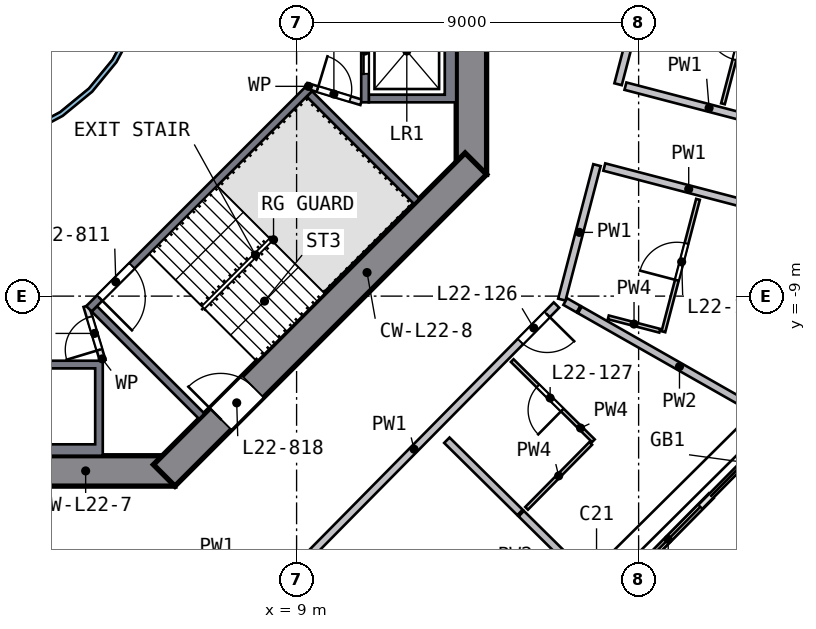
"""IFC4 building model, lengths in metres.
Left out: names, types, materials, properties, quantities, classifications, styles, units other than length and angle.
Written with IfcOpenShell. Run it as: python <this file> out.ifc"""

import sys

from ifc_helpers import new_model, si_unit, direction, frame, frame_2d, origin, origin_2d, place, context, subcontext, project, spatial, polyline, rectangle, outline, extrude, element, fill, save


model = new_model("IFC4")
c1 = context("Model", 3, precision=1e-05, world=origin(), true_north=direction((0.0, 1.0)))
c2 = subcontext(c1, "Body", "Model", "MODEL_VIEW")
j1 = project(units=[si_unit("LENGTHUNIT", "METRE"), si_unit("PLANEANGLEUNIT", "RADIAN")], contexts=[c1])
p1 = place(None, origin())
s1 = spatial("IfcSite", under=j1, at=p1, CompositionType="ELEMENT")
p2 = place(p1, origin())
s2 = spatial("IfcBuilding", under=s1, at=p2, CompositionType="ELEMENT")
p3 = place(p2, frame((0.0, 0.0, 96.5)))
s3 = spatial("IfcBuildingStorey", under=s2, at=p3, CompositionType="ELEMENT", Elevation=96.5)
p4 = place(p3, frame((16.798, -16.588, 0.0), z_axis=(0.078255888, 0.080537401, 0.993674868), x_axis=(0.698489901, 0.706754906, -0.112291409)))
e1 = element("IfcColumn", 1, at=p4, inside=s3, PredefinedType="COLUMN", context=c2, shape_type="SweptSolid", body=[
    extrude(rectangle(XDim=1.15, YDim=0.9, at=origin_2d()), origin(), (0.0, 0.0, 1.0), 3.21),
])
p5 = place(p3, frame((13.6, -5.799, 0.0), z_axis=(0.0, 0.0, 1.0), x_axis=(0.0, 1.0, 0.0)))
e2 = element("IfcWall", 2, at=p5, inside=s3, PredefinedType="SHEAR", context=c2, shape_type="SweptSolid", body=[
    extrude(rectangle(XDim=11.598, YDim=0.8, at=frame_2d((5.799, 0.0))), origin(), (0.0, 0.0, 1.0), 3.5),
])
p6 = place(p5, frame((4.899, 0.0, 0.0)))
e3 = element("IfcOpeningElement", 3, at=p6, cuts=e2, PredefinedType="OPENING", context=c2, shape_type="SweptSolid", body=[
    extrude(rectangle(XDim=1.8, YDim=2.1, at=frame_2d((0.9, 1.05))), frame((0.0, 0.41, 0.0), z_axis=(0.0, -1.0, 0.0), x_axis=(1.0, 0.0, 0.0)), (0.0, 0.0, 1.0), 0.82),
])
p7 = place(p3, frame((-5.799, -13.6, 0.0), z_axis=(0.0, 0.0, 1.0), x_axis=(1.0, 0.0, 0.0)))
e4 = element("IfcWall", 4, at=p7, inside=s3, PredefinedType="SHEAR", context=c2, shape_type="SweptSolid", body=[
    extrude(rectangle(XDim=11.598, YDim=0.8, at=frame_2d((5.799, 0.0))), origin(), (0.0, 0.0, 1.0), 3.5),
])
p8 = place(p7, frame((4.899, 0.0, 0.0)))
e5 = element("IfcOpeningElement", 5, at=p8, cuts=e4, PredefinedType="OPENING", context=c2, shape_type="SweptSolid", body=[
    extrude(rectangle(XDim=1.8, YDim=2.1, at=frame_2d((0.9, 1.05))), frame((0.0, 0.41, 0.0), z_axis=(0.0, -1.0, 0.0), x_axis=(1.0, 0.0, 0.0)), (0.0, 0.0, 1.0), 0.82),
])
p9 = place(p3, frame((5.516, -13.717, 0.0), z_axis=(0.0, 0.0, 1.0), x_axis=(0.707106781, 0.707106781, 0.0)))
e6 = element("IfcWall", 6, at=p9, inside=s3, PredefinedType="SHEAR", context=c2, shape_type="SweptSolid", body=[
    extrude(rectangle(XDim=11.598, YDim=0.8, at=frame_2d((5.799, 0.0))), origin(), (0.0, 0.0, 1.0), 3.5),
])
p10 = place(p9, frame((2.099, 0.0, 0.0)))
e7 = element("IfcOpeningElement", 7, at=p10, cuts=e6, PredefinedType="OPENING", context=c2, shape_type="SweptSolid", body=[
    extrude(rectangle(XDim=1.2, YDim=2.1, at=frame_2d((0.6, 1.05))), frame((0.0, 0.41, 0.0), z_axis=(0.0, -1.0, 0.0), x_axis=(1.0, 0.0, 0.0)), (0.0, 0.0, 1.0), 0.82),
])
p11 = place(p3, frame((17.207, -16.992, 0.0), z_axis=(0.0, 0.0, 1.0), x_axis=(0.702669036, 0.711516848, 0.0)))
e8 = element("IfcWall", 8, at=p11, inside=s3, PredefinedType="SOLIDWALL", context=c2, shape_type="SweptSolid", body=[
    extrude(rectangle(XDim=3.835, YDim=0.15, at=frame_2d((1.918, 0.0))), origin(), (0.0, 0.0, 1.0), 2.425),
])
p12 = place(p11, frame((1.035, 0.0, 0.0)))
e9 = element("IfcOpeningElement", 9, at=p12, cuts=e8, PredefinedType="OPENING", context=c2, shape_type="SweptSolid", body=[
    extrude(rectangle(XDim=2.4, YDim=2.4, at=frame_2d((1.2, 1.2))), frame((0.0, 0.085, 0.0), z_axis=(0.0, -1.0, 0.0), x_axis=(1.0, 0.0, 0.0)), (0.0, 0.0, 1.0), 0.17),
])
p13 = place(p3, frame((14.284, -24.258, 0.0), z_axis=(0.0, 0.0, 1.0), x_axis=(0.702654229, 0.711531471, 0.0)))
e10 = element("IfcWall", 10, at=p13, inside=s3, PredefinedType="SOLIDWALL", context=c2, shape_type="SweptSolid", body=[
    extrude(rectangle(XDim=13.723, YDim=0.5, at=frame_2d((6.862, 0.0))), origin(), (0.0, 0.0, 1.0), 0.7),
])
p14 = place(p3, origin())
e11 = element("IfcWall", 11, at=p14, inside=s3, PredefinedType="SOLIDWALL", context=c2, shape_type="SweptSolid", body=[
    extrude(outline(polyline([(13.2, -3.9), (10.9, -3.9), (10.9, -3.7), (12.9, -3.7), (12.9, -1.4), (10.9, -1.4), (10.9, -1.2), (13.2, -1.2), (13.2, -3.9)])), origin(), (0.0, 0.0, 1.0), 3.19),
])
p15 = place(p3, frame((10.8, -1.2, 0.0), z_axis=(0.0, 0.0, 1.0), x_axis=(0.0, -1.0, 0.0)))
e12 = element("IfcWall", 12, at=p15, inside=s3, PredefinedType="SOLIDWALL", context=c2, shape_type="SweptSolid", body=[
    extrude(rectangle(XDim=2.7, YDim=0.2, at=frame_2d((1.35, 0.0))), origin(), (0.0, 0.0, 1.0), 3.19),
])
p16 = place(p15, frame((0.75, 0.0, 0.0)))
e13 = element("IfcOpeningElement", 13, at=p16, cuts=e12, PredefinedType="OPENING", context=c2, shape_type="SweptSolid", body=[
    extrude(rectangle(XDim=1.2, YDim=2.1, at=frame_2d((0.6, 1.05))), frame((0.0, 0.11, 0.0), z_axis=(0.0, -1.0, 0.0), x_axis=(1.0, 0.0, 0.0)), (0.0, 0.0, 1.0), 0.22),
])
p17 = place(p3, origin())
e14 = element("IfcWall", 14, at=p17, inside=s3, PredefinedType="SOLIDWALL", context=c2, shape_type="SweptSolid", body=[
    extrude(outline(polyline([(3.9, -10.7), (3.9, -13.2), (1.2, -13.2), (1.2, -10.7), (3.9, -10.7)]), holes=[polyline([(1.4, -12.9), (3.7, -12.9), (3.7, -10.9), (1.4, -10.9), (1.4, -12.9)])]), origin(), (0.0, 0.0, 1.0), 3.19),
])
p18 = place(p3, frame((9.334, -3.535, 0.0), z_axis=(0.0, 0.0, 1.0), x_axis=(-0.707106781, -0.707106781, 0.0)))
e15 = element("IfcWall", 15, at=p18, inside=s3, PredefinedType="SOLIDWALL", context=c2, shape_type="SweptSolid", body=[
    extrude(rectangle(XDim=8.2, YDim=0.2, at=frame_2d((4.1, 0.0))), origin(), (0.0, 0.0, 1.0), 3.19),
])
p19 = place(p18, frame((6.6, 0.0, 0.0)))
e16 = element("IfcOpeningElement", 16, at=p19, cuts=e15, PredefinedType="OPENING", context=c2, shape_type="SweptSolid", body=[
    extrude(rectangle(XDim=1.2, YDim=2.1, at=frame_2d((0.6, 1.05))), frame((0.0, 0.11, 0.0), z_axis=(0.0, -1.0, 0.0), x_axis=(1.0, 0.0, 0.0)), (0.0, 0.0, 1.0), 0.22),
])
for number, where, z_axis, x_axis in (
    (17, (3.677, -9.334, 0.0), (0.0, 0.0, 1.0), (0.707, -0.707, 0.0)),
    (18, (9.334, -3.677, 0.0), (0.0, 0.0, 1.0), (0.707, -0.707, 0.0)),
):
    element("IfcWall", number, at=place(p3, frame(where, z_axis=z_axis, x_axis=x_axis)), inside=s3, PredefinedType="SOLIDWALL", context=c2, shape_type="SweptSolid", body=[
        extrude(rectangle(XDim=4.0, YDim=0.2, at=frame_2d((2.0, 0.0))), origin(), (0.0, 0.0, 1.0), 3.19),
    ])
p20 = place(p3, frame((3.9, -10.7, 0.0), z_axis=(0.0, 0.0, 1.0), x_axis=(-0.289808785, 0.957084567, 0.0)))
e19 = element("IfcWall", 19, at=p20, inside=s3, PredefinedType="PARTITIONING", context=c2, shape_type="SweptSolid", body=[
    extrude(rectangle(XDim=1.501, YDim=0.15, at=frame_2d((0.75, 0.0))), origin(), (0.0, 0.0, 1.0), 3.19),
])
p21 = place(p20, frame((0.301, 0.0, 0.0)))
e20 = element("IfcOpeningElement", 20, at=p21, cuts=e19, PredefinedType="OPENING", context=c2, shape_type="SweptSolid", body=[
    extrude(rectangle(XDim=0.9, YDim=2.1, at=frame_2d((0.45, 1.05))), frame((0.0, 0.085, 0.0), z_axis=(0.0, -1.0, 0.0), x_axis=(1.0, 0.0, 0.0)), (0.0, 0.0, 1.0), 0.17),
])
p22 = place(p3, frame((9.263, -3.465, 0.0), z_axis=(0.0, 0.0, 1.0), x_axis=(0.957084567, -0.289808785, 0.0)))
e21 = element("IfcWall", 21, at=p22, inside=s3, PredefinedType="PARTITIONING", context=c2, shape_type="SweptSolid", body=[
    extrude(rectangle(XDim=1.501, YDim=0.15, at=frame_2d((0.75, 0.0))), origin(), (0.0, 0.0, 1.0), 3.19),
])
p23 = place(p22, frame((0.301, 0.0, 0.0)))
e22 = element("IfcOpeningElement", 22, at=p23, cuts=e21, PredefinedType="OPENING", context=c2, shape_type="SweptSolid", body=[
    extrude(rectangle(XDim=0.9, YDim=2.1, at=frame_2d((0.45, 1.05))), frame((0.0, 0.085, 0.0), z_axis=(0.0, -1.0, 0.0), x_axis=(1.0, 0.0, 0.0)), (0.0, 0.0, 1.0), 0.17),
])
p24 = place(p3, origin())
e23 = element("IfcWall", 23, at=p24, inside=s3, PredefinedType="SOLIDWALL", context=c2, shape_type="SweptSolid", body=[
    extrude(outline(polyline([(5.021, -0.999), (4.73, -1.959), (4.257, -2.844), (3.62, -3.62), (2.844, -4.257), (1.959, -4.73), (0.999, -5.021), (0.0, -5.12), (-0.999, -5.021), (-1.959, -4.73), (-2.844, -4.257), (-3.62, -3.62), (-4.257, -2.844), (-4.73, -1.959), (-5.021, -0.999), (-5.12, 0.0), (-5.021, 0.999), (-4.73, 1.959), (-4.257, 2.844), (-3.62, 3.62), (-2.844, 4.257), (-1.959, 4.73), (-0.999, 5.021), (0.0, 5.12), (0.999, 5.021), (1.959, 4.73), (2.844, 4.257), (3.62, 3.62), (4.257, 2.844), (4.73, 1.959), (5.021, 0.999), (5.12, 0.0), (5.021, -0.999)]), holes=[polyline([(4.904, 0.976), (4.619, 1.913), (4.157, 2.778), (3.535, 3.535), (2.778, 4.157), (1.913, 4.619), (0.976, 4.904), (0.0, 5.0), (-0.976, 4.904), (-1.913, 4.619), (-2.778, 4.157), (-3.535, 3.535), (-4.157, 2.778), (-4.619, 1.913), (-4.904, 0.976), (-5.0, 0.0), (-4.904, -0.976), (-4.619, -1.913), (-4.157, -2.778), (-3.535, -3.535), (-2.778, -4.157), (-1.913, -4.619), (-0.976, -4.904), (0.0, -5.0), (0.976, -4.904), (1.913, -4.619), (2.778, -4.157), (3.535, -3.535), (4.157, -2.778), (4.619, -1.913), (4.904, -0.976), (5.0, 0.0), (4.904, 0.976)])]), origin(), (0.0, 0.0, 1.0), 3.19),
])
p25 = place(p3, frame((15.839, -9.235, 0.0), z_axis=(0.0, 0.0, 1.0), x_axis=(-0.702660587, -0.711525192, 0.0)))
e24 = element("IfcWall", 24, at=p25, inside=s3, PredefinedType="SOLIDWALL", context=c2, shape_type="SweptSolid", body=[
    extrude(rectangle(XDim=9.116, YDim=0.2, at=frame_2d((4.558, 0.0))), origin(), (0.0, 0.0, 1.0), 3.19),
])
p26 = place(p25, frame((0.35, 0.0, 0.0)))
e25 = element("IfcOpeningElement", 25, at=p26, cuts=e24, PredefinedType="OPENING", context=c2, shape_type="SweptSolid", body=[
    extrude(rectangle(XDim=1.0, YDim=2.1, at=frame_2d((0.5, 1.05))), frame((0.0, 0.11, 0.0), z_axis=(0.0, -1.0, 0.0), x_axis=(1.0, 0.0, 0.0)), (0.0, 0.0, 1.0), 0.22),
])
p27 = place(p3, frame((15.979, -9.092, 0.0), z_axis=(0.0, 0.0, 1.0), x_axis=(0.25277502, 0.967525084, 0.0)))
e26 = element("IfcWall", 26, at=p27, inside=s3, PredefinedType="SOLIDWALL", context=c2, shape_type="SweptSolid", body=[
    extrude(rectangle(XDim=3.659, YDim=0.2, at=frame_2d((1.829, 0.0))), origin(), (0.0, 0.0, 1.0), 3.19),
])
p28 = place(p3, frame((17.46, -3.424, 0.0), z_axis=(0.0, 0.0, 1.0), x_axis=(0.252791341, 0.96752082, 0.0)))
e27 = element("IfcWall", 27, at=p28, inside=s3, PredefinedType="SOLIDWALL", context=c2, shape_type="SweptSolid", body=[
    extrude(rectangle(XDim=3.658, YDim=0.2, at=frame_2d((1.829, 0.0))), origin(), (0.0, 0.0, 1.0), 3.19),
])
p29 = place(p3, frame((25.989, -7.926, 0.0), z_axis=(0.0, 0.0, 1.0), x_axis=(-0.967533715, 0.252741983, 0.0)))
e28 = element("IfcWall", 28, at=p29, inside=s3, PredefinedType="SOLIDWALL", context=c2, shape_type="SweptSolid", body=[
    extrude(rectangle(XDim=9.19, YDim=0.2, at=frame_2d((4.595, 0.0))), origin(), (0.0, 0.0, 1.0), 3.19),
])
p30 = place(p29, frame((3.4, 0.0, 0.0)))
e29 = element("IfcOpeningElement", 29, at=p30, cuts=e28, PredefinedType="OPENING", context=c2, shape_type="SweptSolid", body=[
    extrude(rectangle(XDim=1.0, YDim=2.1, at=frame_2d((0.5, 1.05))), frame((0.0, 0.11, 0.0), z_axis=(0.0, -1.0, 0.0), x_axis=(1.0, 0.0, 0.0)), (0.0, 0.0, 1.0), 0.22),
])
p31 = place(p3, frame((17.653, -3.475, 0.0), z_axis=(0.0, 0.0, 1.0), x_axis=(0.967535412, -0.252735487, 0.0)))
e30 = element("IfcWall", 30, at=p31, inside=s3, PredefinedType="SOLIDWALL", context=c2, shape_type="SweptSolid", body=[
    extrude(rectangle(XDim=9.19, YDim=0.2, at=frame_2d((4.595, 0.0))), origin(), (0.0, 0.0, 1.0), 3.19),
])
p32 = place(p31, frame((4.75, 0.0, 0.0)))
e31 = element("IfcOpeningElement", 31, at=p32, cuts=e30, PredefinedType="OPENING", context=c2, shape_type="SweptSolid", body=[
    extrude(rectangle(XDim=1.0, YDim=2.1, at=frame_2d((0.5, 1.05))), frame((0.0, 0.11, 0.0), z_axis=(0.0, -1.0, 0.0), x_axis=(1.0, 0.0, 0.0)), (0.0, 0.0, 1.0), 0.22),
])
p33 = place(p3, frame((12.954, -12.792, 0.0), z_axis=(0.0, 0.0, 1.0), x_axis=(0.711560793, -0.702624535, 0.0)))
e32 = element("IfcWall", 32, at=p33, inside=s3, PredefinedType="SOLIDWALL", context=c2, shape_type="SweptSolid", body=[
    extrude(rectangle(XDim=2.705, YDim=0.2, at=frame_2d((1.352, 0.0))), origin(), (0.0, 0.0, 1.0), 3.19),
])
p34 = place(p3, frame((14.911, -14.725, 0.0), z_axis=(0.0, 0.0, 1.0), x_axis=(0.711546698, -0.702638809, 0.0)))
e33 = element("IfcWall", 33, at=p34, inside=s3, PredefinedType="SOLIDWALL", context=c2, shape_type="SweptSolid", body=[
    extrude(rectangle(XDim=3.152, YDim=0.2, at=frame_2d((1.576, 0.0))), origin(), (0.0, 0.0, 1.0), 3.19),
])
p35 = place(p3, frame((16.069, -9.143, 0.0), z_axis=(0.0, 0.0, 1.0), x_axis=(0.869064731, -0.494698386, 0.0)))
e34 = element("IfcWall", 34, at=p35, inside=s3, PredefinedType="SOLIDWALL", context=c2, shape_type="SweptSolid", body=[
    extrude(rectangle(XDim=0.402, YDim=0.2, at=frame_2d((0.201, 0.0))), origin(), (0.0, 0.0, 1.0), 3.19),
])
p36 = place(p3, frame((16.453, -9.362, 0.0), z_axis=(0.0, 0.0, 1.0), x_axis=(0.869145541, -0.494556396, 0.0)))
e35 = element("IfcWall", 35, at=p36, inside=s3, PredefinedType="SOLIDWALL", context=c2, shape_type="SweptSolid", body=[
    extrude(rectangle(XDim=6.034, YDim=0.2, at=frame_2d((3.017, 0.0))), origin(), (0.0, 0.0, 1.0), 3.19),
])
p37 = place(p3, frame((16.81, -12.805, 0.0), z_axis=(0.0, 0.0, 1.0), x_axis=(-0.711568401, 0.702616831, 0.0)))
e36 = element("IfcWall", 36, at=p37, inside=s3, PredefinedType="PARTITIONING", context=c2, shape_type="SweptSolid", body=[
    extrude(rectangle(XDim=3.0, YDim=0.1, at=frame_2d((1.5, 0.0))), origin(), (0.0, 0.0, 1.0), 3.19),
])
p38 = place(p37, frame((1.15, 0.0, 0.0)))
e37 = element("IfcOpeningElement", 37, at=p38, cuts=e36, PredefinedType="OPENING", context=c2, shape_type="SweptSolid", body=[
    extrude(rectangle(XDim=0.9, YDim=2.1, at=frame_2d((0.45, 1.05))), frame((0.0, 0.06, 0.0), z_axis=(0.0, -1.0, 0.0), x_axis=(1.0, 0.0, 0.0)), (0.0, 0.0, 1.0), 0.12),
])
p39 = place(p3, frame((16.74, -12.876, 0.0), z_axis=(0.0, 0.0, 1.0), x_axis=(-0.702719059, -0.711467444, 0.0)))
e38 = element("IfcWall", 38, at=p39, inside=s3, PredefinedType="PARTITIONING", context=c2, shape_type="SweptSolid", body=[
    extrude(rectangle(XDim=2.4, YDim=0.1, at=frame_2d((1.2, 0.0))), origin(), (0.0, 0.0, 1.0), 3.19),
])
p40 = place(p3, frame((18.556, -9.912, 0.0), z_axis=(0.0, 0.0, 1.0), x_axis=(-0.96753195, 0.25274874, 0.0)))
e39 = element("IfcWall", 39, at=p40, inside=s3, PredefinedType="PARTITIONING", context=c2, shape_type="SweptSolid", body=[
    extrude(rectangle(XDim=1.399, YDim=0.1, at=frame_2d((0.699, 0.0))), origin(), (0.0, 0.0, 1.0), 3.19),
])
p41 = place(p3, frame((18.652, -9.937, 0.0), z_axis=(0.0, 0.0, 1.0), x_axis=(0.2527504, 0.967531516, 0.0)))
e40 = element("IfcWall", 40, at=p41, inside=s3, PredefinedType="PARTITIONING", context=c2, shape_type="SweptSolid", body=[
    extrude(rectangle(XDim=3.6, YDim=0.1, at=frame_2d((1.8, 0.0))), origin(), (0.0, 0.0, 1.0), 3.19),
])
p42 = place(p41, frame((1.4, 0.0, 0.0)))
e41 = element("IfcOpeningElement", 41, at=p42, cuts=e40, PredefinedType="OPENING", context=c2, shape_type="SweptSolid", body=[
    extrude(rectangle(XDim=1.0, YDim=2.1, at=frame_2d((0.5, 1.05))), frame((0.0, 0.06, 0.0), z_axis=(0.0, -1.0, 0.0), x_axis=(1.0, 0.0, 0.0)), (0.0, 0.0, 1.0), 0.12),
])
p43 = place(p3, frame((20.219, -3.938, 0.0), z_axis=(0.0, 0.0, 1.0), x_axis=(0.2527504, 0.967531516, 0.0)))
e42 = element("IfcWall", 42, at=p43, inside=s3, PredefinedType="PARTITIONING", context=c2, shape_type="SweptSolid", body=[
    extrude(rectangle(XDim=3.6, YDim=0.1, at=frame_2d((1.8, 0.0))), origin(), (0.0, 0.0, 1.0), 3.19),
])
p44 = place(p43, frame((1.2, 0.0, 0.0)))
e43 = element("IfcOpeningElement", 43, at=p44, cuts=e42, PredefinedType="OPENING", context=c2, shape_type="SweptSolid", body=[
    extrude(rectangle(XDim=1.0, YDim=2.1, at=frame_2d((0.5, 1.05))), frame((0.0, 0.06, 0.0), z_axis=(0.0, -1.0, 0.0), x_axis=(1.0, 0.0, 0.0)), (0.0, 0.0, 1.0), 0.12),
])
p45 = place(p12, origin())
e44 = element("IfcDoor", 44, at=p45, inside=s3, OperationType="SLIDING_TO_LEFT", PredefinedType="DOOR", context=c2, shape_type="SweptSolid", body=[
    extrude(rectangle(XDim=2.4, YDim=2.4, at=frame_2d((1.2, 1.2))), frame((0.0, 0.025, 0.0), z_axis=(0.0, -1.0, 0.0), x_axis=(1.0, 0.0, 0.0)), (0.0, 0.0, 1.0), 0.05),
])
fill(e9, e44)
p46 = place(p16, origin())
e45 = element("IfcDoor", 45, at=p46, inside=s3, OperationType="DOUBLE_DOOR_SLIDING", PredefinedType="DOOR", context=c2, shape_type="SweptSolid", body=[
    extrude(rectangle(XDim=1.2, YDim=2.1, at=frame_2d((0.6, 1.05))), frame((0.0, 0.025, 0.0), z_axis=(0.0, -1.0, 0.0), x_axis=(1.0, 0.0, 0.0)), (0.0, 0.0, 1.0), 0.05),
])
fill(e13, e45)
p47 = place(p19, origin())
e46 = element("IfcDoor", 46, at=p47, inside=s3, OperationType="SINGLE_SWING_RIGHT", PredefinedType="DOOR", context=c2, shape_type="SweptSolid", body=[
    extrude(rectangle(XDim=1.2, YDim=2.1, at=frame_2d((0.6, 1.05))), frame((0.0, 0.025, 0.0), z_axis=(0.0, -1.0, 0.0), x_axis=(1.0, 0.0, 0.0)), (0.0, 0.0, 1.0), 0.05),
])
fill(e16, e46)
p48 = place(p10, origin())
e47 = element("IfcDoor", 47, at=p48, inside=s3, OperationType="SINGLE_SWING_LEFT", PredefinedType="DOOR", context=c2, shape_type="SweptSolid", body=[
    extrude(rectangle(XDim=1.2, YDim=2.1, at=frame_2d((0.6, 1.05))), frame((0.0, 0.025, 0.0), z_axis=(0.0, -1.0, 0.0), x_axis=(1.0, 0.0, 0.0)), (0.0, 0.0, 1.0), 0.05),
])
fill(e7, e47)
p49 = place(p21, origin())
e48 = element("IfcDoor", 48, at=p49, inside=s3, OperationType="SINGLE_SWING_LEFT", PredefinedType="DOOR", context=c2, shape_type="SweptSolid", body=[
    extrude(rectangle(XDim=0.9, YDim=2.1, at=frame_2d((0.45, 1.05))), frame((0.0, 0.025, 0.0), z_axis=(0.0, -1.0, 0.0), x_axis=(1.0, 0.0, 0.0)), (0.0, 0.0, 1.0), 0.05),
])
fill(e20, e48)
p50 = place(p23, origin())
e49 = element("IfcDoor", 49, at=p50, inside=s3, OperationType="SINGLE_SWING_LEFT", PredefinedType="DOOR", context=c2, shape_type="SweptSolid", body=[
    extrude(rectangle(XDim=0.9, YDim=2.1, at=frame_2d((0.45, 1.05))), frame((0.0, 0.025, 0.0), z_axis=(0.0, -1.0, 0.0), x_axis=(1.0, 0.0, 0.0)), (0.0, 0.0, 1.0), 0.05),
])
fill(e22, e49)
p51 = place(p26, origin())
e50 = element("IfcDoor", 50, at=p51, inside=s3, OperationType="SINGLE_SWING_LEFT", PredefinedType="DOOR", context=c2, shape_type="SweptSolid", body=[
    extrude(rectangle(XDim=1.0, YDim=2.1, at=frame_2d((0.5, 1.05))), frame((0.0, 0.025, 0.0), z_axis=(0.0, -1.0, 0.0), x_axis=(1.0, 0.0, 0.0)), (0.0, 0.0, 1.0), 0.05),
])
fill(e25, e50)
p52 = place(p38, origin())
e51 = element("IfcDoor", 51, at=p52, inside=s3, OperationType="SINGLE_SWING_LEFT", PredefinedType="DOOR", context=c2, shape_type="SweptSolid", body=[
    extrude(rectangle(XDim=0.9, YDim=2.1, at=frame_2d((0.45, 1.05))), frame((0.0, 0.025, 0.0), z_axis=(0.0, -1.0, 0.0), x_axis=(1.0, 0.0, 0.0)), (0.0, 0.0, 1.0), 0.05),
])
fill(e37, e51)
p53 = place(p42, origin())
e52 = element("IfcDoor", 52, at=p53, inside=s3, OperationType="SINGLE_SWING_LEFT", PredefinedType="DOOR", context=c2, shape_type="SweptSolid", body=[
    extrude(rectangle(XDim=1.0, YDim=2.1, at=frame_2d((0.5, 1.05))), frame((0.0, 0.025, 0.0), z_axis=(0.0, -1.0, 0.0), x_axis=(1.0, 0.0, 0.0)), (0.0, 0.0, 1.0), 0.05),
])
fill(e41, e52)
p54 = place(p44, origin())
e53 = element("IfcDoor", 53, at=p54, inside=s3, OperationType="SINGLE_SWING_RIGHT", PredefinedType="DOOR", context=c2, shape_type="SweptSolid", body=[
    extrude(rectangle(XDim=1.0, YDim=2.1, at=frame_2d((0.5, 1.05))), frame((0.0, 0.025, 0.0), z_axis=(0.0, -1.0, 0.0), x_axis=(1.0, 0.0, 0.0)), (0.0, 0.0, 1.0), 0.05),
])
fill(e43, e53)
save(model, sys.argv[1])
